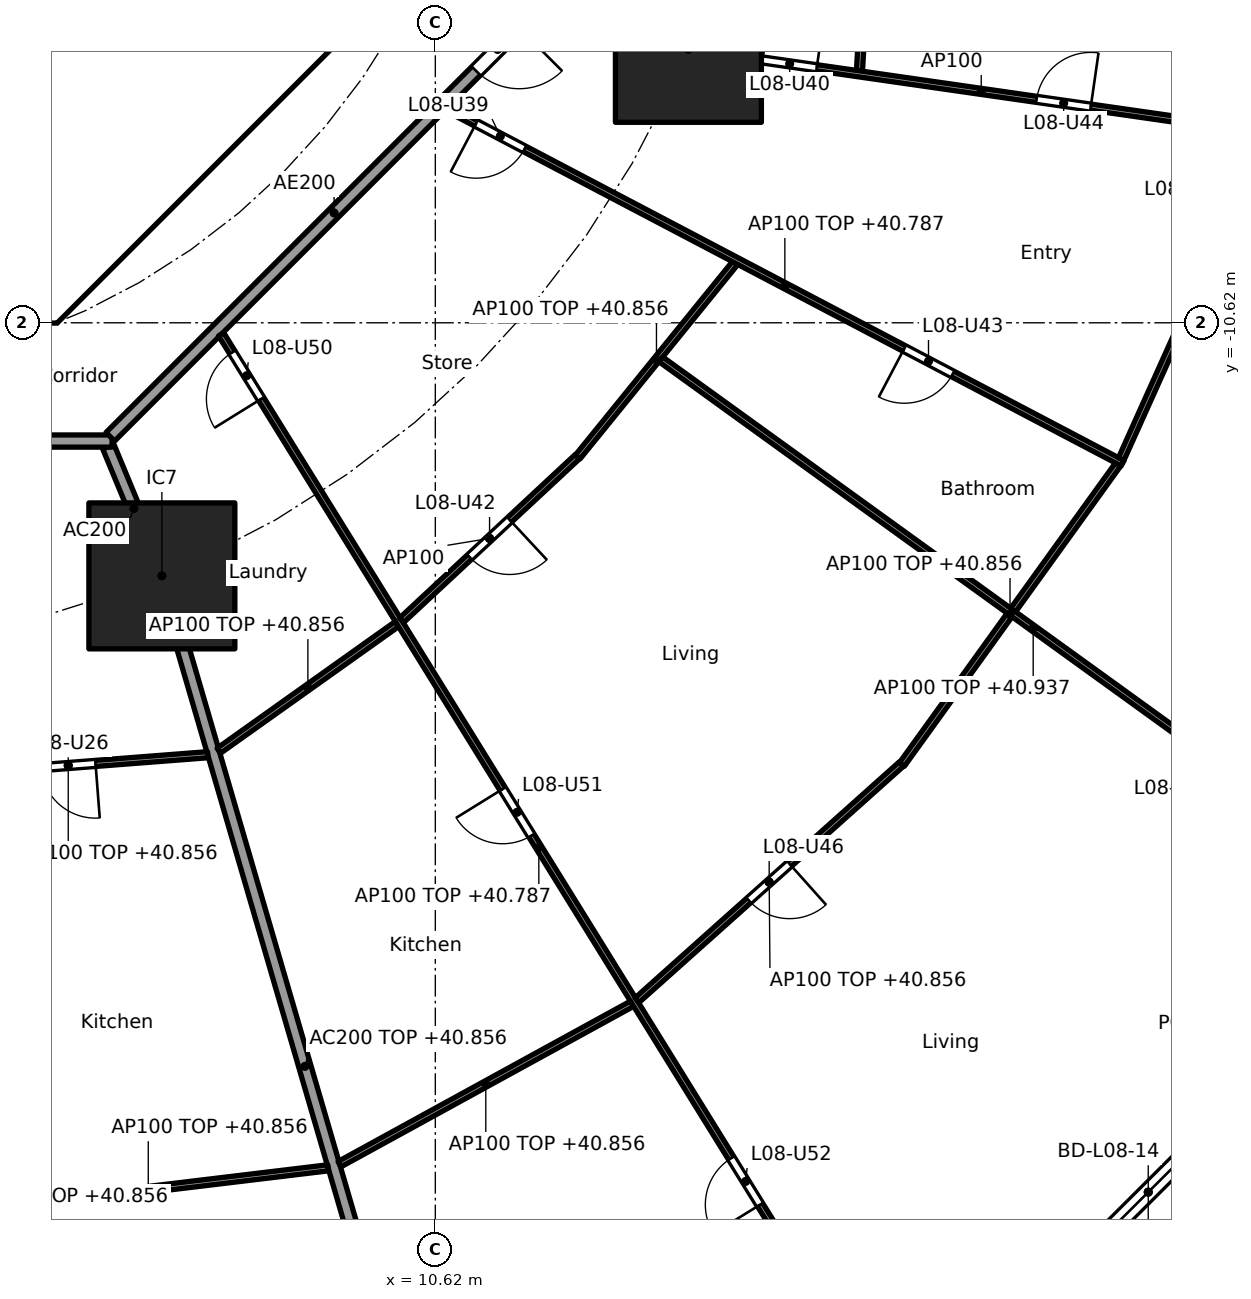
"""IFC4 building model, lengths in metres.
Left out: names, types, materials, properties, quantities, classifications, styles, units other than length and angle.
Written with IfcOpenShell. Run it as: python <this file> out.ifc"""

import sys

from ifc_helpers import new_model, si_unit, direction, frame, frame_2d, origin, origin_2d, place, context, subcontext, project, spatial, polyline, rectangle, outline, extrude, element, fill, save


model = new_model("IFC4")
c1 = context("Model", 3, precision=1e-05, world=origin(), true_north=direction((0.0, 1.0)))
c2 = subcontext(c1, "Body", "Model", "MODEL_VIEW")
j1 = project(units=[si_unit("LENGTHUNIT", "METRE"), si_unit("PLANEANGLEUNIT", "RADIAN")], contexts=[c1])
p1 = place(None, origin())
s1 = spatial("IfcSite", under=j1, at=p1, CompositionType="ELEMENT")
p2 = place(p1, origin())
s2 = spatial("IfcBuilding", under=s1, at=p2, CompositionType="ELEMENT")
p3 = place(p2, frame((0.0, 0.0, 38.1)))
s3 = spatial("IfcBuildingStorey", under=s2, at=p3, CompositionType="ELEMENT", Elevation=38.1)
for number, where, z_axis, x_axis in (
    (1, (6.123, -14.782, 0.0), (0.0, 0.0, 1.0), (1.0, 0.0, 0.0)),
    (2, (14.782, -6.123, 0.0), (0.0, 0.0, 1.0), (1.0, 0.0, 0.0)),
):
    element("IfcColumn", number, at=place(p3, frame(where, z_axis=z_axis, x_axis=x_axis)), inside=s3, PredefinedType="COLUMN", context=c2, shape_type="SweptSolid", body=[
        extrude(rectangle(XDim=2.4, YDim=2.4, at=origin_2d()), origin(), (0.0, 0.0, 1.0), 3.7),
    ])
p4 = place(p3, frame((23.522, -23.74, 0.0), z_axis=(0.0, 0.0, 1.0), x_axis=(-0.707803094595, -0.706409781417, 0.0)))
e3 = element("IfcWall", 3, at=p4, inside=s3, PredefinedType="SOLIDWALL", context=c2, shape_type="SweptSolid", body=[
    extrude(rectangle(XDim=3.329, YDim=0.25, at=frame_2d((1.665, 0.0))), origin(), (0.0, 0.0, 1.0), 3.44),
])
p5 = place(p4, frame((0.615, 0.0, 0.0)))
e4 = element("IfcOpeningElement", 4, at=p5, cuts=e3, PredefinedType="OPENING", context=c2, shape_type="SweptSolid", body=[
    extrude(rectangle(XDim=2.1, YDim=2.4, at=frame_2d((1.05, 1.2))), frame((0.0, 0.135, 0.0), z_axis=(0.0, -1.0, 0.0), x_axis=(1.0, 0.0, 0.0)), (0.0, 0.0, 1.0), 0.27),
])
p6 = place(p3, frame((4.613, -9.988, 0.0), z_axis=(0.0, 0.0, 1.0), x_axis=(0.707106781187, 0.707106781187, 0.0)))
e5 = element("IfcWall", 5, at=p6, inside=s3, PredefinedType="SHEAR", context=c2, shape_type="SweptSolid", body=[
    extrude(rectangle(XDim=7.602, YDim=0.6, at=frame_2d((3.801, 0.0))), origin(), (0.0, 0.0, 1.0), 3.44),
])
p7 = place(p6, frame((3.201, 0.0, 0.0)))
e6 = element("IfcOpeningElement", 6, at=p7, cuts=e5, PredefinedType="OPENING", context=c2, shape_type="SweptSolid", body=[
    extrude(rectangle(XDim=1.2, YDim=2.1, at=frame_2d((0.6, 1.05))), frame((0.0, 0.31, 0.0), z_axis=(0.0, -1.0, 0.0), x_axis=(1.0, 0.0, 0.0)), (0.0, 0.0, 1.0), 0.62),
])
p8 = place(p3, origin())
e7 = element("IfcWall", 7, at=p8, inside=s3, PredefinedType="SHEAR", context=c2, shape_type="SweptSolid", body=[
    extrude(outline(polyline([(-4.152, -10.025), (4.152, -10.025), (4.401, -9.776), (4.825, -10.2), (4.401, -10.625), (-4.401, -10.625), (-4.825, -10.2), (-4.401, -9.776), (-4.152, -10.025)])), origin(), (0.0, 0.0, 1.0), 3.44),
])
p9 = place(p3, frame((5.243, -12.657, 0.0), z_axis=(0.0, 0.0, 1.0), x_axis=(0.382707856524, -0.923869415315, 0.0)))
e8 = element("IfcWall", 8, at=p9, inside=s3, PredefinedType="PARTITIONING", context=c2, shape_type="SweptSolid", body=[
    extrude(rectangle(XDim=2.2, YDim=0.2, at=frame_2d((1.1, 0.0))), origin(), (0.0, 0.0, 1.0), 3.44),
])
p10 = place(p3, frame((6.137, -14.83, 0.0), z_axis=(0.0, 0.0, 1.0), x_axis=(0.27985745069, -0.960041565399, 0.0)))
e9 = element("IfcWall", 9, at=p10, inside=s3, PredefinedType="PARTITIONING", context=c2, shape_type="SweptSolid", body=[
    extrude(rectangle(XDim=16.705, YDim=0.2, at=frame_2d((8.353, 0.0))), origin(), (0.0, 0.0, 1.0), 2.756),
])
p11 = place(p3, frame((-5.104, -12.565, 0.0), z_axis=(0.0, 0.0, 1.0), x_axis=(1.0, 0.0, 0.0)))
e10 = element("IfcWall", 10, at=p11, inside=s3, PredefinedType="PARTITIONING", context=c2, shape_type="SweptSolid", body=[
    extrude(rectangle(XDim=10.409, YDim=0.2, at=frame_2d((5.205, 0.0))), origin(), (0.0, 0.0, 1.0), 3.44),
])
p12 = place(p11, frame((2.87, 0.0, 0.0)))
e11 = element("IfcOpeningElement", 11, at=p12, cuts=e10, PredefinedType="OPENING", context=c2, shape_type="SweptSolid", body=[
    extrude(rectangle(XDim=1.0, YDim=2.1, at=frame_2d((0.5, 1.05))), frame((0.0, 0.11, 0.0), z_axis=(0.0, -1.0, 0.0), x_axis=(1.0, 0.0, 0.0)), (0.0, 0.0, 1.0), 0.22),
])
p13 = place(p3, frame((5.275, -12.494, 0.0), z_axis=(0.0, 0.0, 1.0), x_axis=(0.707106781187, 0.707106781187, 0.0)))
e12 = element("IfcWall", 12, at=p13, inside=s3, PredefinedType="PARTITIONING", context=c2, shape_type="SweptSolid", body=[
    extrude(rectangle(XDim=10.409, YDim=0.2, at=frame_2d((5.205, 0.0))), origin(), (0.0, 0.0, 1.0), 3.44),
])
p14 = place(p13, frame((8.508, 0.0, 0.0)))
e13 = element("IfcOpeningElement", 13, at=p14, cuts=e12, PredefinedType="OPENING", context=c2, shape_type="SweptSolid", body=[
    extrude(rectangle(XDim=1.0, YDim=2.1, at=frame_2d((0.5, 1.05))), frame((0.0, 0.11, 0.0), z_axis=(0.0, -1.0, 0.0), x_axis=(1.0, 0.0, 0.0)), (0.0, 0.0, 1.0), 0.22),
])
p15 = place(p3, frame((17.971, -0.05, 0.0), z_axis=(0.0, 0.0, 1.0), x_axis=(-0.058475267553, -0.998288857538, 0.0)))
e14 = element("IfcWall", 14, at=p15, inside=s3, PredefinedType="PARTITIONING", context=c2, shape_type="SweptSolid", body=[
    extrude(rectangle(XDim=6.438, YDim=0.1, at=frame_2d((3.219, 0.0))), origin(), (0.0, 0.0, 1.0), 2.756),
])
p16 = place(p3, frame((2.288, -18.078, 0.0), z_axis=(0.0, 0.0, 1.0), x_axis=(0.99701850123, 0.077162868047, 0.0)))
e15 = element("IfcWall", 15, at=p16, inside=s3, PredefinedType="PARTITIONING", context=c2, shape_type="SweptSolid", body=[
    extrude(rectangle(XDim=4.604, YDim=0.1, at=frame_2d((2.302, 0.0))), origin(), (0.0, 0.0, 1.0), 2.756),
])
p17 = place(p16, frame((1.852, 0.0, 0.0)))
e16 = element("IfcOpeningElement", 16, at=p17, cuts=e15, PredefinedType="OPENING", context=c2, shape_type="SweptSolid", body=[
    extrude(rectangle(XDim=0.9, YDim=2.1, at=frame_2d((0.45, 1.05))), frame((0.0, 0.06, 0.0), z_axis=(0.0, -1.0, 0.0), x_axis=(1.0, 0.0, 0.0)), (0.0, 0.0, 1.0), 0.12),
])
p18 = place(p3, frame((2.941, -25.229, 0.0), z_axis=(0.0, 0.0, 1.0), x_axis=(0.992834127896, 0.119500604542, 0.0)))
e17 = element("IfcWall", 17, at=p18, inside=s3, PredefinedType="PARTITIONING", context=c2, shape_type="SweptSolid", body=[
    extrude(rectangle(XDim=5.959, YDim=0.1, at=frame_2d((2.98, 0.0))), origin(), (0.0, 0.0, 1.0), 2.756),
])
p19 = place(p3, frame((7.06, -17.657, 0.0), z_axis=(0.0, 0.0, 1.0), x_axis=(0.81492039338, 0.57957290521, 0.0)))
e18 = element("IfcWall", 18, at=p19, inside=s3, PredefinedType="PARTITIONING", context=c2, shape_type="SweptSolid", body=[
    extrude(rectangle(XDim=3.594, YDim=0.1, at=frame_2d((1.797, 0.0))), origin(), (0.0, 0.0, 1.0), 2.756),
])
p20 = place(p3, frame((9.045, -24.456, 0.0), z_axis=(0.0, 0.0, 1.0), x_axis=(0.876809987787, 0.480837025734, 0.0)))
e19 = element("IfcWall", 19, at=p20, inside=s3, PredefinedType="PARTITIONING", context=c2, shape_type="SweptSolid", body=[
    extrude(rectangle(XDim=5.486, YDim=0.1, at=frame_2d((2.743, 0.0))), origin(), (0.0, 0.0, 1.0), 2.756),
])
p21 = place(p3, frame((7.097, -10.81, 0.0), z_axis=(0.0, 0.0, 1.0), x_axis=(0.526453266471, -0.850204068576, 0.0)))
e20 = element("IfcWall", 20, at=p21, inside=s3, PredefinedType="PARTITIONING", context=c2, shape_type="SweptSolid", body=[
    extrude(rectangle(XDim=19.85, YDim=0.1, at=frame_2d((9.925, 0.0))), origin(), (0.0, 0.0, 1.0), 2.687),
])
p22 = place(p21, frame((0.35, 0.0, 0.0)))
e21 = element("IfcOpeningElement", 21, at=p22, cuts=e20, PredefinedType="OPENING", context=c2, shape_type="SweptSolid", body=[
    extrude(rectangle(XDim=0.9, YDim=2.1, at=frame_2d((0.45, 1.05))), frame((0.0, 0.06, 0.0), z_axis=(0.0, -1.0, 0.0), x_axis=(1.0, 0.0, 0.0)), (0.0, 0.0, 1.0), 0.12),
])
p23 = place(p21, frame((8.795, 0.0, 0.0)))
e22 = element("IfcOpeningElement", 22, at=p23, cuts=e20, PredefinedType="OPENING", context=c2, shape_type="SweptSolid", body=[
    extrude(rectangle(XDim=0.9, YDim=2.1, at=frame_2d((0.45, 1.05))), frame((0.0, 0.06, 0.0), z_axis=(0.0, -1.0, 0.0), x_axis=(1.0, 0.0, 0.0)), (0.0, 0.0, 1.0), 0.12),
])
p24 = place(p21, frame((15.935, 0.0, 0.0)))
e23 = element("IfcOpeningElement", 23, at=p24, cuts=e20, PredefinedType="OPENING", context=c2, shape_type="SweptSolid", body=[
    extrude(rectangle(XDim=0.9, YDim=2.1, at=frame_2d((0.45, 1.05))), frame((0.0, 0.06, 0.0), z_axis=(0.0, -1.0, 0.0), x_axis=(1.0, 0.0, 0.0)), (0.0, 0.0, 1.0), 0.12),
])
p25 = place(p3, frame((10.066, -15.511, 0.0), z_axis=(0.0, 0.0, 1.0), x_axis=(0.732022571638, 0.681280378855, 0.0)))
e24 = element("IfcWall", 24, at=p25, inside=s3, PredefinedType="PARTITIONING", context=c2, shape_type="SweptSolid", body=[
    extrude(rectangle(XDim=3.95, YDim=0.1, at=frame_2d((1.975, 0.0))), origin(), (0.0, 0.0, 1.0), 3.44),
])
p26 = place(p25, frame((1.525, 0.0, 0.0)))
e25 = element("IfcOpeningElement", 25, at=p26, cuts=e24, PredefinedType="OPENING", context=c2, shape_type="SweptSolid", body=[
    extrude(rectangle(XDim=0.9, YDim=2.1, at=frame_2d((0.45, 1.05))), frame((0.0, 0.06, 0.0), z_axis=(0.0, -1.0, 0.0), x_axis=(1.0, 0.0, 0.0)), (0.0, 0.0, 1.0), 0.12),
])
p27 = place(p3, frame((13.936, -21.761, 0.0), z_axis=(0.0, 0.0, 1.0), x_axis=(0.745806142791, 0.666163041136, 0.0)))
e26 = element("IfcWall", 26, at=p27, inside=s3, PredefinedType="PARTITIONING", context=c2, shape_type="SweptSolid", body=[
    extrude(rectangle(XDim=5.831, YDim=0.1, at=frame_2d((2.915, 0.0))), origin(), (0.0, 0.0, 1.0), 2.756),
])
p28 = place(p27, frame((2.465, 0.0, 0.0)))
e27 = element("IfcOpeningElement", 27, at=p28, cuts=e26, PredefinedType="OPENING", context=c2, shape_type="SweptSolid", body=[
    extrude(rectangle(XDim=0.9, YDim=2.1, at=frame_2d((0.45, 1.05))), frame((0.0, 0.06, 0.0), z_axis=(0.0, -1.0, 0.0), x_axis=(1.0, 0.0, 0.0)), (0.0, 0.0, 1.0), 0.12),
])
p29 = place(p3, frame((12.963, -12.825, 0.0), z_axis=(0.0, 0.0, 1.0), x_axis=(0.63012473344, 0.776493928056, 0.0)))
e28 = element("IfcWall", 28, at=p29, inside=s3, PredefinedType="PARTITIONING", context=c2, shape_type="SweptSolid", body=[
    extrude(rectangle(XDim=4.106, YDim=0.1, at=frame_2d((2.053, 0.0))), origin(), (0.0, 0.0, 1.0), 2.756),
])
p30 = place(p3, frame((18.293, -17.884, 0.0), z_axis=(0.0, 0.0, 1.0), x_axis=(0.584558392935, 0.811351640936, 0.0)))
e29 = element("IfcWall", 29, at=p30, inside=s3, PredefinedType="PARTITIONING", context=c2, shape_type="SweptSolid", body=[
    extrude(rectangle(XDim=6.084, YDim=0.1, at=frame_2d((3.042, 0.0))), origin(), (0.0, 0.0, 1.0), 2.756),
])
p31 = place(p3, frame((14.329, -11.221, 0.0), z_axis=(0.0, 0.0, 1.0), x_axis=(0.810671130917, -0.58550176558, 0.0)))
e30 = element("IfcWall", 30, at=p31, inside=s3, PredefinedType="PARTITIONING", context=c2, shape_type="SweptSolid", body=[
    extrude(rectangle(XDim=15.106, YDim=0.1, at=frame_2d((7.553, 0.0))), origin(), (0.0, 0.0, 1.0), 2.837),
])
p32 = place(p31, frame((10.659, 0.0, 0.0)))
e31 = element("IfcOpeningElement", 31, at=p32, cuts=e30, PredefinedType="OPENING", context=c2, shape_type="SweptSolid", body=[
    extrude(rectangle(XDim=0.9, YDim=2.1, at=frame_2d((0.45, 1.05))), frame((0.0, 0.06, 0.0), z_axis=(0.0, -1.0, 0.0), x_axis=(1.0, 0.0, 0.0)), (0.0, 0.0, 1.0), 0.12),
])
p33 = place(p3, frame((10.813, -7.091, 0.0), z_axis=(0.0, 0.0, 1.0), x_axis=(0.885182649479, -0.465243674928, 0.0)))
e32 = element("IfcWall", 32, at=p33, inside=s3, PredefinedType="PARTITIONING", context=c2, shape_type="SweptSolid", body=[
    extrude(rectangle(XDim=12.551, YDim=0.1, at=frame_2d((6.275, 0.0))), origin(), (0.0, 0.0, 1.0), 2.687),
])
p34 = place(p33, frame((0.539, 0.0, 0.0)))
e33 = element("IfcOpeningElement", 33, at=p34, cuts=e32, PredefinedType="OPENING", context=c2, shape_type="SweptSolid", body=[
    extrude(rectangle(XDim=0.9, YDim=2.1, at=frame_2d((0.45, 1.05))), frame((0.0, 0.06, 0.0), z_axis=(0.0, -1.0, 0.0), x_axis=(1.0, 0.0, 0.0)), (0.0, 0.0, 1.0), 0.12),
])
p35 = place(p33, frame((8.494, 0.0, 0.0)))
e34 = element("IfcOpeningElement", 34, at=p35, cuts=e32, PredefinedType="OPENING", context=c2, shape_type="SweptSolid", body=[
    extrude(rectangle(XDim=0.9, YDim=2.1, at=frame_2d((0.45, 1.05))), frame((0.0, 0.06, 0.0), z_axis=(0.0, -1.0, 0.0), x_axis=(1.0, 0.0, 0.0)), (0.0, 0.0, 1.0), 0.12),
])
p36 = place(p3, frame((21.899, -12.861, 0.0), z_axis=(0.0, 0.0, 1.0), x_axis=(0.410197710154, 0.911996622025, 0.0)))
e35 = element("IfcWall", 35, at=p36, inside=s3, PredefinedType="PARTITIONING", context=c2, shape_type="SweptSolid", body=[
    extrude(rectangle(XDim=5.837, YDim=0.1, at=frame_2d((2.918, 0.0))), origin(), (0.0, 0.0, 1.0), 2.756),
])
p37 = place(p36, frame((3.928, 0.0, 0.0)))
e36 = element("IfcOpeningElement", 36, at=p37, cuts=e35, PredefinedType="OPENING", context=c2, shape_type="SweptSolid", body=[
    extrude(rectangle(XDim=0.9, YDim=2.1, at=frame_2d((0.45, 1.05))), frame((0.0, 0.06, 0.0), z_axis=(0.0, -1.0, 0.0), x_axis=(1.0, 0.0, 0.0)), (0.0, 0.0, 1.0), 0.12),
])
p38 = place(p3, frame((14.832, -6.13, 0.0), z_axis=(0.0, 0.0, 1.0), x_axis=(0.989837122016, -0.142205737856, 0.0)))
e37 = element("IfcWall", 37, at=p38, inside=s3, PredefinedType="PARTITIONING", context=c2, shape_type="SweptSolid", body=[
    extrude(rectangle(XDim=9.63, YDim=0.1, at=frame_2d((4.815, 0.0))), origin(), (0.0, 0.0, 1.0), 3.44),
])
p39 = place(p38, frame((1.182, 0.0, 0.0)))
e38 = element("IfcOpeningElement", 38, at=p39, cuts=e37, PredefinedType="OPENING", context=c2, shape_type="SweptSolid", body=[
    extrude(rectangle(XDim=0.9, YDim=2.1, at=frame_2d((0.45, 1.05))), frame((0.0, 0.06, 0.0), z_axis=(0.0, -1.0, 0.0), x_axis=(1.0, 0.0, 0.0)), (0.0, 0.0, 1.0), 0.12),
])
p40 = place(p38, frame((5.734, 0.0, 0.0)))
e39 = element("IfcOpeningElement", 39, at=p40, cuts=e37, PredefinedType="OPENING", context=c2, shape_type="SweptSolid", body=[
    extrude(rectangle(XDim=0.9, YDim=2.1, at=frame_2d((0.45, 1.05))), frame((0.0, 0.06, 0.0), z_axis=(0.0, -1.0, 0.0), x_axis=(1.0, 0.0, 0.0)), (0.0, 0.0, 1.0), 0.12),
])
p41 = place(p5, origin())
e40 = element("IfcDoor", 40, at=p41, inside=s3, OperationType="SLIDING_TO_LEFT", PredefinedType="DOOR", context=c2, shape_type="SweptSolid", body=[
    extrude(rectangle(XDim=2.1, YDim=2.4, at=frame_2d((1.05, 1.2))), frame((0.0, 0.025, 0.0), z_axis=(0.0, -1.0, 0.0), x_axis=(1.0, 0.0, 0.0)), (0.0, 0.0, 1.0), 0.05),
])
fill(e4, e40)
p42 = place(p7, origin())
e41 = element("IfcDoor", 41, at=p42, inside=s3, OperationType="SINGLE_SWING_RIGHT", PredefinedType="DOOR", context=c2, shape_type="SweptSolid", body=[
    extrude(rectangle(XDim=1.2, YDim=2.1, at=frame_2d((0.6, 1.05))), frame((0.0, 0.025, 0.0), z_axis=(0.0, -1.0, 0.0), x_axis=(1.0, 0.0, 0.0)), (0.0, 0.0, 1.0), 0.05),
])
fill(e6, e41)
p43 = place(p17, frame((0.9, 0.0, 0.0), x_axis=(-1.0, 0.0, 0.0)))
e42 = element("IfcDoor", 42, at=p43, inside=s3, OperationType="SINGLE_SWING_LEFT", PredefinedType="DOOR", context=c2, shape_type="SweptSolid", body=[
    extrude(rectangle(XDim=0.9, YDim=2.1, at=frame_2d((0.45, 1.05))), frame((0.0, 0.025, 0.0), z_axis=(0.0, -1.0, 0.0), x_axis=(1.0, 0.0, 0.0)), (0.0, 0.0, 1.0), 0.05),
])
fill(e16, e42)
p44 = place(p14, frame((1.0, 0.0, 0.0), x_axis=(-1.0, 0.0, 0.0)))
e43 = element("IfcDoor", 43, at=p44, inside=s3, OperationType="SINGLE_SWING_LEFT", PredefinedType="DOOR", context=c2, shape_type="SweptSolid", body=[
    extrude(rectangle(XDim=1.0, YDim=2.1, at=frame_2d((0.5, 1.05))), frame((0.0, 0.025, 0.0), z_axis=(0.0, -1.0, 0.0), x_axis=(1.0, 0.0, 0.0)), (0.0, 0.0, 1.0), 0.05),
])
fill(e13, e43)
p45 = place(p34, frame((0.9, 0.0, 0.0), x_axis=(-1.0, 0.0, 0.0)))
e44 = element("IfcDoor", 44, at=p45, inside=s3, OperationType="SINGLE_SWING_RIGHT", PredefinedType="DOOR", context=c2, shape_type="SweptSolid", body=[
    extrude(rectangle(XDim=0.9, YDim=2.1, at=frame_2d((0.45, 1.05))), frame((0.0, 0.025, 0.0), z_axis=(0.0, -1.0, 0.0), x_axis=(1.0, 0.0, 0.0)), (0.0, 0.0, 1.0), 0.05),
])
fill(e33, e44)
p46 = place(p39, origin())
e45 = element("IfcDoor", 45, at=p46, inside=s3, OperationType="SINGLE_SWING_RIGHT", PredefinedType="DOOR", context=c2, shape_type="SweptSolid", body=[
    extrude(rectangle(XDim=0.9, YDim=2.1, at=frame_2d((0.45, 1.05))), frame((0.0, 0.025, 0.0), z_axis=(0.0, -1.0, 0.0), x_axis=(1.0, 0.0, 0.0)), (0.0, 0.0, 1.0), 0.05),
])
fill(e38, e45)
p47 = place(p26, frame((0.9, 0.0, 0.0), x_axis=(-1.0, 0.0, 0.0)))
e46 = element("IfcDoor", 46, at=p47, inside=s3, OperationType="SINGLE_SWING_LEFT", PredefinedType="DOOR", context=c2, shape_type="SweptSolid", body=[
    extrude(rectangle(XDim=0.9, YDim=2.1, at=frame_2d((0.45, 1.05))), frame((0.0, 0.025, 0.0), z_axis=(0.0, -1.0, 0.0), x_axis=(1.0, 0.0, 0.0)), (0.0, 0.0, 1.0), 0.05),
])
fill(e25, e46)
p48 = place(p35, frame((0.9, 0.0, 0.0), x_axis=(-1.0, 0.0, 0.0)))
e47 = element("IfcDoor", 47, at=p48, inside=s3, OperationType="SINGLE_SWING_RIGHT", PredefinedType="DOOR", context=c2, shape_type="SweptSolid", body=[
    extrude(rectangle(XDim=0.9, YDim=2.1, at=frame_2d((0.45, 1.05))), frame((0.0, 0.025, 0.0), z_axis=(0.0, -1.0, 0.0), x_axis=(1.0, 0.0, 0.0)), (0.0, 0.0, 1.0), 0.05),
])
fill(e34, e47)
p49 = place(p40, origin())
e48 = element("IfcDoor", 48, at=p49, inside=s3, OperationType="SINGLE_SWING_RIGHT", PredefinedType="DOOR", context=c2, shape_type="SweptSolid", body=[
    extrude(rectangle(XDim=0.9, YDim=2.1, at=frame_2d((0.45, 1.05))), frame((0.0, 0.025, 0.0), z_axis=(0.0, -1.0, 0.0), x_axis=(1.0, 0.0, 0.0)), (0.0, 0.0, 1.0), 0.05),
])
fill(e39, e48)
p50 = place(p28, frame((0.9, 0.0, 0.0), x_axis=(-1.0, 0.0, 0.0)))
e49 = element("IfcDoor", 49, at=p50, inside=s3, OperationType="SINGLE_SWING_LEFT", PredefinedType="DOOR", context=c2, shape_type="SweptSolid", body=[
    extrude(rectangle(XDim=0.9, YDim=2.1, at=frame_2d((0.45, 1.05))), frame((0.0, 0.025, 0.0), z_axis=(0.0, -1.0, 0.0), x_axis=(1.0, 0.0, 0.0)), (0.0, 0.0, 1.0), 0.05),
])
fill(e27, e49)
p51 = place(p22, frame((0.9, 0.0, 0.0), x_axis=(-1.0, 0.0, 0.0)))
e50 = element("IfcDoor", 50, at=p51, inside=s3, OperationType="SINGLE_SWING_LEFT", PredefinedType="DOOR", context=c2, shape_type="SweptSolid", body=[
    extrude(rectangle(XDim=0.9, YDim=2.1, at=frame_2d((0.45, 1.05))), frame((0.0, 0.025, 0.0), z_axis=(0.0, -1.0, 0.0), x_axis=(1.0, 0.0, 0.0)), (0.0, 0.0, 1.0), 0.05),
])
fill(e21, e50)
p52 = place(p23, frame((0.9, 0.0, 0.0), x_axis=(-1.0, 0.0, 0.0)))
e51 = element("IfcDoor", 51, at=p52, inside=s3, OperationType="SINGLE_SWING_RIGHT", PredefinedType="DOOR", context=c2, shape_type="SweptSolid", body=[
    extrude(rectangle(XDim=0.9, YDim=2.1, at=frame_2d((0.45, 1.05))), frame((0.0, 0.025, 0.0), z_axis=(0.0, -1.0, 0.0), x_axis=(1.0, 0.0, 0.0)), (0.0, 0.0, 1.0), 0.05),
])
fill(e22, e51)
p53 = place(p24, frame((0.9, 0.0, 0.0), x_axis=(-1.0, 0.0, 0.0)))
e52 = element("IfcDoor", 52, at=p53, inside=s3, OperationType="SINGLE_SWING_LEFT", PredefinedType="DOOR", context=c2, shape_type="SweptSolid", body=[
    extrude(rectangle(XDim=0.9, YDim=2.1, at=frame_2d((0.45, 1.05))), frame((0.0, 0.025, 0.0), z_axis=(0.0, -1.0, 0.0), x_axis=(1.0, 0.0, 0.0)), (0.0, 0.0, 1.0), 0.05),
])
fill(e23, e52)
save(model, sys.argv[1])
